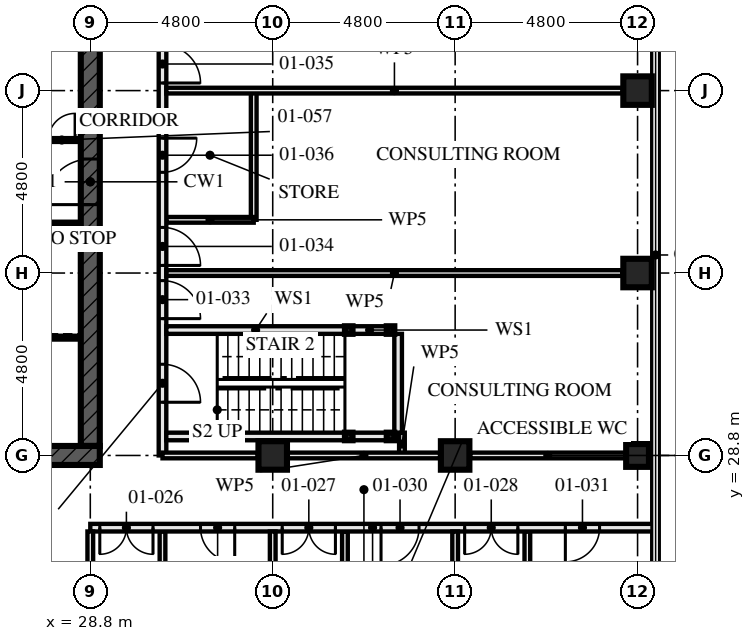
"""IFC4 building model, lengths in metres.
Left out: names, types, materials, properties, quantities, classifications, styles, units other than length and angle.
Written with IfcOpenShell. Run it as: python <this file> out.ifc"""

import sys

from ifc_helpers import new_model, si_unit, direction, frame, frame_2d, origin, origin_2d, place, context, subcontext, project, spatial, rectangle, hollow_rectangle, extrude, element, fill, save


model = new_model("IFC4")
c1 = context("Model", 3, precision=1e-05, world=origin(), true_north=direction((0.0, 1.0)))
c2 = subcontext(c1, "Body", "Model", "MODEL_VIEW")
j1 = project(units=[si_unit("LENGTHUNIT", "METRE"), si_unit("PLANEANGLEUNIT", "RADIAN")], contexts=[c1])
p1 = place(None, origin())
s1 = spatial("IfcSite", under=j1, at=p1, CompositionType="ELEMENT")
p2 = place(p1, origin())
s2 = spatial("IfcBuilding", under=s1, at=p2, CompositionType="ELEMENT")
p3 = place(p2, frame((0.0, 0.0, 4.5)))
s3 = spatial("IfcBuildingStorey", under=s2, at=p3, CompositionType="ELEMENT", Elevation=4.5)
for number, where, z_axis, x_axis in (
    (1, (33.6, 28.8, 0.0), (0.0, 0.0, 1.0), (0.0, 1.0, 0.0)),
    (2, (38.4, 28.8, 0.0), (0.0, 0.0, 1.0), (0.0, 1.0, 0.0)),
):
    element("IfcColumn", number, at=place(p3, frame(where, z_axis=z_axis, x_axis=x_axis)), inside=s3, PredefinedType="COLUMN", context=c2, shape_type="SweptSolid", body=[
        extrude(hollow_rectangle(XDim=0.75, YDim=0.75, WallThickness=0.08, at=origin_2d()), origin(), (0.0, 0.0, 1.0), 4.5),
    ])
p4 = place(p3, frame((43.2, 28.8, 0.0), z_axis=(0.0, 0.0, 1.0), x_axis=(0.0, 1.0, 0.0)))
e3 = element("IfcColumn", 3, at=p4, inside=s3, PredefinedType="COLUMN", context=c2, shape_type="SweptSolid", body=[
    extrude(hollow_rectangle(XDim=0.6, YDim=0.6, WallThickness=0.08, at=origin_2d()), origin(), (0.0, 0.0, 1.0), 4.5),
])
for number, where, z_axis, x_axis in (
    (4, (43.2, 33.6, 0.0), (0.0, 0.0, 1.0), (1.0, 0.0, 0.0)),
    (5, (43.2, 38.4, 0.0), (0.0, 0.0, 1.0), (1.0, 0.0, 0.0)),
):
    element("IfcColumn", number, at=place(p3, frame(where, z_axis=z_axis, x_axis=x_axis)), inside=s3, PredefinedType="COLUMN", context=c2, shape_type="SweptSolid", body=[
        extrude(hollow_rectangle(XDim=0.75, YDim=0.75, WallThickness=0.08, at=origin_2d()), origin(), (0.0, 0.0, 1.0), 4.5),
    ])
p5 = place(p3, frame((14.15, 28.8, -0.17), z_axis=(0.0, 0.0, 1.0), x_axis=(1.0, 0.0, 0.0)))
e6 = element("IfcWall", 6, at=p5, inside=s3, PredefinedType="SHEAR", context=c2, shape_type="SweptSolid", body=[
    extrude(rectangle(XDim=14.9, YDim=0.5, at=frame_2d((7.45, 0.0))), origin(), (0.0, 0.0, 1.0), 4.5),
])
p6 = place(p5, frame((6.85, 0.0, 0.17)))
e7 = element("IfcOpeningElement", 7, at=p6, cuts=e6, PredefinedType="OPENING", context=c2, shape_type="SweptSolid", body=[
    extrude(rectangle(XDim=1.2, YDim=2.1, at=frame_2d((0.6, 1.05))), frame((0.0, 0.26, 0.0), z_axis=(0.0, -1.0, 0.0), x_axis=(1.0, 0.0, 0.0)), (0.0, 0.0, 1.0), 0.521),
])
p7 = place(p3, frame((28.8, 29.05, -0.17), z_axis=(0.0, 0.0, 1.0), x_axis=(0.0, 1.0, 0.0)))
e8 = element("IfcWall", 8, at=p7, inside=s3, PredefinedType="SHEAR", context=c2, shape_type="SweptSolid", body=[
    extrude(rectangle(XDim=13.9, YDim=0.5, at=frame_2d((6.95, 0.0))), origin(), (0.0, 0.0, 1.0), 4.5),
])
p8 = place(p7, frame((6.35, 0.0, 0.17)))
e9 = element("IfcOpeningElement", 9, at=p8, cuts=e8, PredefinedType="OPENING", context=c2, shape_type="SweptSolid", body=[
    extrude(rectangle(XDim=1.2, YDim=2.1, at=frame_2d((0.6, 1.05))), frame((0.0, 0.26, 0.0), z_axis=(0.0, -1.0, 0.0), x_axis=(1.0, 0.0, 0.0)), (0.0, 0.0, 1.0), 0.521),
])
for number, where, z_axis, x_axis in (
    (10, (36.7, 29.3, 0.0), (0.0, 0.0, 1.0), (1.0, 0.0, 0.0)),
    (11, (36.7, 32.1, 0.0), (0.0, 0.0, 1.0), (1.0, 0.0, 0.0)),
    (12, (35.6, 29.3, 0.0), (0.0, 0.0, 1.0), (1.0, 0.0, 0.0)),
    (13, (35.6, 32.1, 0.0), (0.0, 0.0, 1.0), (1.0, 0.0, 0.0)),
):
    element("IfcColumn", number, at=place(p3, frame(where, z_axis=z_axis, x_axis=x_axis)), inside=s3, PredefinedType="COLUMN", context=c2, shape_type="SweptSolid", body=[
        extrude(hollow_rectangle(XDim=0.2, YDim=0.2, WallThickness=0.008, at=origin_2d()), origin(), (0.0, 0.0, 1.0), 4.33),
    ])
for number, where, z_axis, x_axis in (
    (14, (30.7, 23.8, 0.0), (0.0, 0.0, 1.0), (0.0, 1.0, 0.0)),
    (15, (35.5, 23.8, 0.0), (0.0, 0.0, 1.0), (0.0, 1.0, 0.0)),
    (16, (40.3, 23.8, 0.0), (0.0, 0.0, 1.0), (0.0, 1.0, 0.0)),
):
    element("IfcWall", number, at=place(p3, frame(where, z_axis=z_axis, x_axis=x_axis)), inside=s3, PredefinedType="PARTITIONING", context=c2, shape_type="SweptSolid", body=[
        extrude(rectangle(XDim=3.0, YDim=0.15, at=frame_2d((1.5, 0.0))), origin(), (0.0, 0.0, 1.0), 3.55),
    ])
p9 = place(p3, frame((33.6, 14.705, 0.0), z_axis=(0.0, 0.0, 1.0), x_axis=(0.0, 1.0, 0.0)))
e17 = element("IfcWall", 17, at=p9, inside=s3, PredefinedType="PARTITIONING", context=c2, shape_type="SweptSolid", body=[
    extrude(rectangle(XDim=12.095, YDim=0.15, at=frame_2d((6.048, 0.0))), origin(), (0.0, 0.0, 1.0), 3.55),
])
p10 = place(p3, frame((38.4, 19.504, 0.0), z_axis=(0.0, 0.0, 1.0), x_axis=(0.0, 1.0, 0.0)))
e18 = element("IfcWall", 18, at=p10, inside=s3, PredefinedType="PARTITIONING", context=c2, shape_type="SweptSolid", body=[
    extrude(rectangle(XDim=7.296, YDim=0.15, at=frame_2d((3.648, 0.0))), origin(), (0.0, 0.0, 1.0), 3.55),
])
p11 = place(p3, frame((28.8, 26.9, 0.0), z_axis=(0.0, 0.0, 1.0), x_axis=(1.0, 0.0, 0.0)))
e19 = element("IfcWall", 19, at=p11, inside=s3, PredefinedType="PARTITIONING", context=c2, shape_type="SweptSolid", body=[
    extrude(rectangle(XDim=14.855, YDim=0.2, at=frame_2d((7.427, 0.0))), origin(), (0.0, 0.0, 1.0), 3.32),
])
p12 = place(p11, frame((0.25, 0.0, 0.0)))
e20 = element("IfcOpeningElement", 20, at=p12, cuts=e19, PredefinedType="OPENING", context=c2, shape_type="SweptSolid", body=[
    extrude(rectangle(XDim=1.4, YDim=2.4, at=frame_2d((0.7, 1.2))), frame((0.0, 0.111, 0.0), z_axis=(0.0, -1.0, 0.0), x_axis=(1.0, 0.0, 0.0)), (0.0, 0.0, 1.0), 0.221),
])
p13 = place(p11, frame((5.05, 0.0, 0.0)))
e21 = element("IfcOpeningElement", 21, at=p13, cuts=e19, PredefinedType="OPENING", context=c2, shape_type="SweptSolid", body=[
    extrude(rectangle(XDim=1.4, YDim=2.4, at=frame_2d((0.7, 1.2))), frame((0.0, 0.111, 0.0), z_axis=(0.0, -1.0, 0.0), x_axis=(1.0, 0.0, 0.0)), (0.0, 0.0, 1.0), 0.221),
])
p14 = place(p11, frame((9.85, 0.0, 0.0)))
e22 = element("IfcOpeningElement", 22, at=p14, cuts=e19, PredefinedType="OPENING", context=c2, shape_type="SweptSolid", body=[
    extrude(rectangle(XDim=1.4, YDim=2.4, at=frame_2d((0.7, 1.2))), frame((0.0, 0.111, 0.0), z_axis=(0.0, -1.0, 0.0), x_axis=(1.0, 0.0, 0.0)), (0.0, 0.0, 1.0), 0.221),
])
p15 = place(p11, frame((2.9, 0.0, 0.0)))
e23 = element("IfcOpeningElement", 23, at=p15, cuts=e19, PredefinedType="OPENING", context=c2, shape_type="SweptSolid", body=[
    extrude(rectangle(XDim=0.9, YDim=2.1, at=frame_2d((0.45, 1.05))), frame((0.0, 0.111, 0.0), z_axis=(0.0, -1.0, 0.0), x_axis=(1.0, 0.0, 0.0)), (0.0, 0.0, 1.0), 0.221),
])
p16 = place(p11, frame((7.65, 0.0, 0.0)))
e24 = element("IfcOpeningElement", 24, at=p16, cuts=e19, PredefinedType="OPENING", context=c2, shape_type="SweptSolid", body=[
    extrude(rectangle(XDim=1.0, YDim=2.1, at=frame_2d((0.5, 1.05))), frame((0.0, 0.111, 0.0), z_axis=(0.0, -1.0, 0.0), x_axis=(1.0, 0.0, 0.0)), (0.0, 0.0, 1.0), 0.221),
])
p17 = place(p11, frame((12.5, 0.0, 0.0)))
e25 = element("IfcOpeningElement", 25, at=p17, cuts=e19, PredefinedType="OPENING", context=c2, shape_type="SweptSolid", body=[
    extrude(rectangle(XDim=0.9, YDim=2.1, at=frame_2d((0.45, 1.05))), frame((0.0, 0.111, 0.0), z_axis=(0.0, -1.0, 0.0), x_axis=(1.0, 0.0, 0.0)), (0.0, 0.0, 1.0), 0.221),
])
p18 = place(p3, frame((36.6, 29.3, 0.0), z_axis=(0.0, 0.0, 1.0), x_axis=(-1.0, 0.0, 0.0)))
e26 = element("IfcWall", 26, at=p18, inside=s3, PredefinedType="SOLIDWALL", context=c2, shape_type="SweptSolid", body=[
    extrude(rectangle(XDim=0.9, YDim=0.2, at=frame_2d((0.45, 0.0))), origin(), (0.0, 0.0, 1.0), 3.99),
])
p19 = place(p3, frame((35.5, 29.3, 0.0), z_axis=(0.0, 0.0, 1.0), x_axis=(-1.0, 0.0, 0.0)))
e27 = element("IfcWall", 27, at=p19, inside=s3, PredefinedType="SOLIDWALL", context=c2, shape_type="SweptSolid", body=[
    extrude(rectangle(XDim=4.7, YDim=0.2, at=frame_2d((2.35, 0.0))), origin(), (0.0, 0.0, 1.0), 3.99),
])
p20 = place(p3, frame((36.6, 32.1, 0.0), z_axis=(0.0, 0.0, 1.0), x_axis=(-1.0, 0.0, 0.0)))
e28 = element("IfcWall", 28, at=p20, inside=s3, PredefinedType="SOLIDWALL", context=c2, shape_type="SweptSolid", body=[
    extrude(rectangle(XDim=0.9, YDim=0.2, at=frame_2d((0.45, 0.0))), origin(), (0.0, 0.0, 1.0), 3.99),
])
p21 = place(p3, frame((35.5, 32.1, 0.0), z_axis=(0.0, 0.0, 1.0), x_axis=(-1.0, 0.0, 0.0)))
e29 = element("IfcWall", 29, at=p21, inside=s3, PredefinedType="SOLIDWALL", context=c2, shape_type="SweptSolid", body=[
    extrude(rectangle(XDim=4.7, YDim=0.2, at=frame_2d((2.35, 0.0))), origin(), (0.0, 0.0, 1.0), 3.99),
])
p22 = place(p3, frame((36.9, 29.4, 0.0), z_axis=(0.0, 0.0, 1.0), x_axis=(0.0, 1.0, 0.0)))
e30 = element("IfcWall", 30, at=p22, inside=s3, PredefinedType="SOLIDWALL", context=c2, shape_type="SweptSolid", body=[
    extrude(rectangle(XDim=2.6, YDim=0.2, at=frame_2d((1.3, 0.0))), origin(), (0.0, 0.0, 1.0), 4.33),
])
p23 = place(p3, frame((33.1, 35.0, 0.0), z_axis=(0.0, 0.0, 1.0), x_axis=(-1.0, 0.0, 0.0)))
e31 = element("IfcWall", 31, at=p23, inside=s3, PredefinedType="PARTITIONING", context=c2, shape_type="SweptSolid", body=[
    extrude(rectangle(XDim=2.3, YDim=0.15, at=frame_2d((1.15, 0.0))), origin(), (0.0, 0.0, 1.0), 4.33),
])
p24 = place(p3, frame((33.1, 35.0, 0.0), z_axis=(0.0, 0.0, 1.0), x_axis=(0.0, 1.0, 0.0)))
e32 = element("IfcWall", 32, at=p24, inside=s3, PredefinedType="PARTITIONING", context=c2, shape_type="SweptSolid", body=[
    extrude(rectangle(XDim=3.4, YDim=0.15, at=frame_2d((1.7, 0.0))), origin(), (0.0, 0.0, 1.0), 4.33),
])
for number, where, z_axis, x_axis in (
    (33, (42.805, 33.6, 0.0), (0.0, 0.0, 1.0), (-1.0, 0.0, 0.0)),
    (34, (42.805, 38.4, 0.0), (0.0, 0.0, 1.0), (-1.0, 0.0, 0.0)),
):
    element("IfcWall", number, at=place(p3, frame(where, z_axis=z_axis, x_axis=x_axis)), inside=s3, PredefinedType="PARTITIONING", context=c2, shape_type="SweptSolid", body=[
        extrude(rectangle(XDim=12.005, YDim=0.15, at=frame_2d((6.002, 0.0))), origin(), (0.0, 0.0, 1.0), 3.55),
    ])
p25 = place(p3, frame((37.0, 28.8, 0.0), z_axis=(0.0, 0.0, 1.0), x_axis=(0.0, 1.0, 0.0)))
e35 = element("IfcWall", 35, at=p25, inside=s3, PredefinedType="PARTITIONING", context=c2, shape_type="SweptSolid", body=[
    extrude(rectangle(XDim=0.6, YDim=0.15, at=frame_2d((0.3, 0.0))), origin(), (0.0, 0.0, 1.0), 4.33),
])
p26 = place(p3, frame((30.7, 28.8, 0.0), z_axis=(0.0, 0.0, 1.0), x_axis=(0.0, 1.0, 0.0)))
e36 = element("IfcWall", 36, at=p26, inside=s3, PredefinedType="PARTITIONING", context=c2, shape_type="SweptSolid", body=[
    extrude(rectangle(XDim=14.4, YDim=0.2, at=frame_2d((7.2, 0.0))), origin(), (0.0, 0.0, 1.0), 3.55),
])
p27 = place(p26, frame((1.4, 0.0, 0.0)))
e37 = element("IfcOpeningElement", 37, at=p27, cuts=e36, PredefinedType="OPENING", context=c2, shape_type="SweptSolid", body=[
    extrude(rectangle(XDim=1.0, YDim=2.1, at=frame_2d((0.5, 1.05))), frame((0.0, 0.111, 0.0), z_axis=(0.0, -1.0, 0.0), x_axis=(1.0, 0.0, 0.0)), (0.0, 0.0, 1.0), 0.221),
])
p28 = place(p26, frame((3.6, 0.0, 0.0)))
e38 = element("IfcOpeningElement", 38, at=p28, cuts=e36, PredefinedType="OPENING", context=c2, shape_type="SweptSolid", body=[
    extrude(rectangle(XDim=1.0, YDim=2.4, at=frame_2d((0.5, 1.2))), frame((0.0, 0.111, 0.0), z_axis=(0.0, -1.0, 0.0), x_axis=(1.0, 0.0, 0.0)), (0.0, 0.0, 1.0), 0.221),
])
p29 = place(p26, frame((5.0, 0.0, 0.0)))
e39 = element("IfcOpeningElement", 39, at=p29, cuts=e36, PredefinedType="OPENING", context=c2, shape_type="SweptSolid", body=[
    extrude(rectangle(XDim=1.0, YDim=2.4, at=frame_2d((0.5, 1.2))), frame((0.0, 0.111, 0.0), z_axis=(0.0, -1.0, 0.0), x_axis=(1.0, 0.0, 0.0)), (0.0, 0.0, 1.0), 0.221),
])
p30 = place(p26, frame((9.8, 0.0, 0.0)))
e40 = element("IfcOpeningElement", 40, at=p30, cuts=e36, PredefinedType="OPENING", context=c2, shape_type="SweptSolid", body=[
    extrude(rectangle(XDim=1.0, YDim=2.4, at=frame_2d((0.5, 1.2))), frame((0.0, 0.111, 0.0), z_axis=(0.0, -1.0, 0.0), x_axis=(1.0, 0.0, 0.0)), (0.0, 0.0, 1.0), 0.221),
])
p31 = place(p26, frame((7.45, 0.0, 0.0)))
e41 = element("IfcOpeningElement", 41, at=p31, cuts=e36, PredefinedType="OPENING", context=c2, shape_type="SweptSolid", body=[
    extrude(rectangle(XDim=0.9, YDim=2.1, at=frame_2d((0.45, 1.05))), frame((0.0, 0.111, 0.0), z_axis=(0.0, -1.0, 0.0), x_axis=(1.0, 0.0, 0.0)), (0.0, 0.0, 1.0), 0.221),
])
p32 = place(p26, frame((12.2, 0.0, 0.0)))
e42 = element("IfcOpeningElement", 42, at=p32, cuts=e36, PredefinedType="OPENING", context=c2, shape_type="SweptSolid", body=[
    extrude(rectangle(XDim=1.0, YDim=2.1, at=frame_2d((0.5, 1.05))), frame((0.0, 0.111, 0.0), z_axis=(0.0, -1.0, 0.0), x_axis=(1.0, 0.0, 0.0)), (0.0, 0.0, 1.0), 0.221),
])
p33 = place(p3, frame((23.05, 34.9, 0.0), z_axis=(0.0, 0.0, 1.0), x_axis=(1.0, 0.0, 0.0)))
e43 = element("IfcWall", 43, at=p33, inside=s3, PredefinedType="SOLIDWALL", context=c2, shape_type="SweptSolid", body=[
    extrude(rectangle(XDim=5.5, YDim=0.1, at=frame_2d((2.75, 0.0))), origin(), (0.0, 0.0, 1.0), 4.33),
])
p34 = place(p3, frame((22.65, 37.1, 0.0), z_axis=(0.0, 0.0, 1.0), x_axis=(1.0, 0.0, 0.0)))
e44 = element("IfcWall", 44, at=p34, inside=s3, PredefinedType="SOLIDWALL", context=c2, shape_type="SweptSolid", body=[
    extrude(rectangle(XDim=5.9, YDim=0.1, at=frame_2d((2.95, 0.0))), origin(), (0.0, 0.0, 1.0), 4.33),
])
p35 = place(p34, frame((3.5, 0.0, 0.0)))
e45 = element("IfcOpeningElement", 45, at=p35, cuts=e44, PredefinedType="OPENING", context=c2, shape_type="SweptSolid", body=[
    extrude(rectangle(XDim=0.9, YDim=2.1, at=frame_2d((0.45, 1.05))), frame((0.0, 0.061, 0.0), z_axis=(0.0, -1.0, 0.0), x_axis=(1.0, 0.0, 0.0)), (0.0, 0.0, 1.0), 0.121),
])
p36 = place(p34, frame((5.05, 0.0, 0.0)))
e46 = element("IfcOpeningElement", 46, at=p36, cuts=e44, PredefinedType="OPENING", context=c2, shape_type="SweptSolid", body=[
    extrude(rectangle(XDim=0.7, YDim=2.1, at=frame_2d((0.35, 1.05))), frame((0.0, 0.061, 0.0), z_axis=(0.0, -1.0, 0.0), x_axis=(1.0, 0.0, 0.0)), (0.0, 0.0, 1.0), 0.121),
])
p37 = place(p3, frame((23.15, 31.9, 0.0), z_axis=(0.0, 0.0, 1.0), x_axis=(1.0, 0.0, 0.0)))
e47 = element("IfcWall", 47, at=p37, inside=s3, PredefinedType="SOLIDWALL", context=c2, shape_type="SweptSolid", body=[
    extrude(rectangle(XDim=5.4, YDim=0.1, at=frame_2d((2.7, 0.0))), origin(), (0.0, 0.0, 1.0), 4.33),
])
p38 = place(p3, frame((28.8, 24.395, 0.0), z_axis=(0.0, 0.0, 1.0), x_axis=(0.0, 1.0, 0.0)))
e48 = element("IfcWall", 48, at=p38, inside=s3, PredefinedType="PARTITIONING", context=c2, shape_type="SweptSolid", body=[
    extrude(rectangle(XDim=2.405, YDim=0.15, at=frame_2d((1.203, 0.0))), origin(), (0.0, 0.0, 1.0), 3.32),
])
p39 = place(p3, frame((42.88, 28.8, 0.0), z_axis=(0.0, 0.0, 1.0), x_axis=(-1.0, 0.0, 0.0)))
e49 = element("IfcWall", 49, at=p39, inside=s3, PredefinedType="PARTITIONING", context=c2, shape_type="SweptSolid", body=[
    extrude(rectangle(XDim=4.085, YDim=0.15, at=frame_2d((2.042, 0.0))), origin(), (0.0, 0.0, 1.0), 3.32),
])
p40 = place(p3, frame((38.005, 28.8, 0.0), z_axis=(0.0, 0.0, 1.0), x_axis=(-1.0, 0.0, 0.0)))
e50 = element("IfcWall", 50, at=p40, inside=s3, PredefinedType="PARTITIONING", context=c2, shape_type="SweptSolid", body=[
    extrude(rectangle(XDim=4.01, YDim=0.15, at=frame_2d((2.005, 0.0))), origin(), (0.0, 0.0, 1.0), 3.32),
])
p41 = place(p3, frame((33.205, 28.8, 0.0), z_axis=(0.0, 0.0, 1.0), x_axis=(-1.0, 0.0, 0.0)))
e51 = element("IfcWall", 51, at=p41, inside=s3, PredefinedType="PARTITIONING", context=c2, shape_type="SweptSolid", body=[
    extrude(rectangle(XDim=2.505, YDim=0.15, at=frame_2d((1.252, 0.0))), origin(), (0.0, 0.0, 1.0), 3.32),
])
p42 = place(p12, frame((1.4, 0.0, 0.0), z_axis=(0.0, 0.0, 1.0), x_axis=(-1.0, 0.0, 0.0)))
e52 = element("IfcDoor", 52, at=p42, inside=s3, OperationType="DOUBLE_DOOR_SINGLE_SWING", PredefinedType="DOOR", context=c2, shape_type="SweptSolid", body=[
    extrude(rectangle(XDim=1.4, YDim=2.4, at=frame_2d((0.7, 1.2))), frame((0.0, 0.027, 0.0), z_axis=(0.0, -1.0, 0.0), x_axis=(1.0, 0.0, 0.0)), (0.0, 0.0, 1.0), 0.054),
])
fill(e20, e52)
p43 = place(p13, frame((1.4, 0.0, 0.0), z_axis=(0.0, 0.0, 1.0), x_axis=(-1.0, 0.0, 0.0)))
e53 = element("IfcDoor", 53, at=p43, inside=s3, OperationType="DOUBLE_DOOR_SINGLE_SWING", PredefinedType="DOOR", context=c2, shape_type="SweptSolid", body=[
    extrude(rectangle(XDim=1.4, YDim=2.4, at=frame_2d((0.7, 1.2))), frame((0.0, 0.027, 0.0), z_axis=(0.0, -1.0, 0.0), x_axis=(1.0, 0.0, 0.0)), (0.0, 0.0, 1.0), 0.054),
])
fill(e21, e53)
p44 = place(p14, frame((1.4, 0.0, 0.0), z_axis=(0.0, 0.0, 1.0), x_axis=(-1.0, 0.0, 0.0)))
e54 = element("IfcDoor", 54, at=p44, inside=s3, OperationType="DOUBLE_DOOR_SINGLE_SWING", PredefinedType="DOOR", context=c2, shape_type="SweptSolid", body=[
    extrude(rectangle(XDim=1.4, YDim=2.4, at=frame_2d((0.7, 1.2))), frame((0.0, 0.027, 0.0), z_axis=(0.0, -1.0, 0.0), x_axis=(1.0, 0.0, 0.0)), (0.0, 0.0, 1.0), 0.054),
])
fill(e22, e54)
p45 = place(p15, frame((0.9, 0.0, 0.0), z_axis=(0.0, 0.0, 1.0), x_axis=(-1.0, 0.0, 0.0)))
e55 = element("IfcDoor", 55, at=p45, inside=s3, OperationType="SINGLE_SWING_RIGHT", PredefinedType="DOOR", context=c2, shape_type="SweptSolid", body=[
    extrude(rectangle(XDim=0.9, YDim=2.1, at=frame_2d((0.45, 1.05))), frame((0.0, 0.027, 0.0), z_axis=(0.0, -1.0, 0.0), x_axis=(1.0, 0.0, 0.0)), (0.0, 0.0, 1.0), 0.054),
])
fill(e23, e55)
p46 = place(p16, frame((1.0, 0.0, 0.0), z_axis=(0.0, 0.0, 1.0), x_axis=(-1.0, 0.0, 0.0)))
e56 = element("IfcDoor", 56, at=p46, inside=s3, OperationType="SINGLE_SWING_LEFT", PredefinedType="DOOR", context=c2, shape_type="SweptSolid", body=[
    extrude(rectangle(XDim=1.0, YDim=2.1, at=frame_2d((0.5, 1.05))), frame((0.0, 0.027, 0.0), z_axis=(0.0, -1.0, 0.0), x_axis=(1.0, 0.0, 0.0)), (0.0, 0.0, 1.0), 0.054),
])
fill(e24, e56)
p47 = place(p17, frame((0.9, 0.0, 0.0), z_axis=(0.0, 0.0, 1.0), x_axis=(-1.0, 0.0, 0.0)))
e57 = element("IfcDoor", 57, at=p47, inside=s3, OperationType="SINGLE_SWING_LEFT", PredefinedType="DOOR", context=c2, shape_type="SweptSolid", body=[
    extrude(rectangle(XDim=0.9, YDim=2.1, at=frame_2d((0.45, 1.05))), frame((0.0, 0.027, 0.0), z_axis=(0.0, -1.0, 0.0), x_axis=(1.0, 0.0, 0.0)), (0.0, 0.0, 1.0), 0.054),
])
fill(e25, e57)
p48 = place(p27, frame((1.0, 0.0, 0.0), z_axis=(0.0, 0.0, 1.0), x_axis=(-1.0, 0.0, 0.0)))
e58 = element("IfcDoor", 58, at=p48, inside=s3, OperationType="SINGLE_SWING_LEFT", PredefinedType="DOOR", context=c2, shape_type="SweptSolid", body=[
    extrude(rectangle(XDim=1.0, YDim=2.1, at=frame_2d((0.5, 1.05))), frame((0.0, 0.032, 0.0), z_axis=(0.0, -1.0, 0.0), x_axis=(1.0, 0.0, 0.0)), (0.0, 0.0, 1.0), 0.064),
])
fill(e37, e58)
p49 = place(p28, frame((1.0, 0.0, 0.0), z_axis=(0.0, 0.0, 1.0), x_axis=(-1.0, 0.0, 0.0)))
e59 = element("IfcDoor", 59, at=p49, inside=s3, OperationType="SINGLE_SWING_LEFT", PredefinedType="DOOR", context=c2, shape_type="SweptSolid", body=[
    extrude(rectangle(XDim=1.0, YDim=2.4, at=frame_2d((0.5, 1.2))), frame((0.0, 0.027, 0.0), z_axis=(0.0, -1.0, 0.0), x_axis=(1.0, 0.0, 0.0)), (0.0, 0.0, 1.0), 0.054),
])
fill(e38, e59)
p50 = place(p29, frame((1.0, 0.0, 0.0), z_axis=(0.0, 0.0, 1.0), x_axis=(-1.0, 0.0, 0.0)))
e60 = element("IfcDoor", 60, at=p50, inside=s3, OperationType="SINGLE_SWING_LEFT", PredefinedType="DOOR", context=c2, shape_type="SweptSolid", body=[
    extrude(rectangle(XDim=1.0, YDim=2.4, at=frame_2d((0.5, 1.2))), frame((0.0, 0.027, 0.0), z_axis=(0.0, -1.0, 0.0), x_axis=(1.0, 0.0, 0.0)), (0.0, 0.0, 1.0), 0.054),
])
fill(e39, e60)
p51 = place(p30, frame((1.0, 0.0, 0.0), z_axis=(0.0, 0.0, 1.0), x_axis=(-1.0, 0.0, 0.0)))
e61 = element("IfcDoor", 61, at=p51, inside=s3, OperationType="SINGLE_SWING_LEFT", PredefinedType="DOOR", context=c2, shape_type="SweptSolid", body=[
    extrude(rectangle(XDim=1.0, YDim=2.4, at=frame_2d((0.5, 1.2))), frame((0.0, 0.027, 0.0), z_axis=(0.0, -1.0, 0.0), x_axis=(1.0, 0.0, 0.0)), (0.0, 0.0, 1.0), 0.054),
])
fill(e40, e61)
p52 = place(p31, frame((0.9, 0.0, 0.0), z_axis=(0.0, 0.0, 1.0), x_axis=(-1.0, 0.0, 0.0)))
e62 = element("IfcDoor", 62, at=p52, inside=s3, OperationType="SINGLE_SWING_RIGHT", PredefinedType="DOOR", context=c2, shape_type="SweptSolid", body=[
    extrude(rectangle(XDim=0.9, YDim=2.1, at=frame_2d((0.45, 1.05))), frame((0.0, 0.027, 0.0), z_axis=(0.0, -1.0, 0.0), x_axis=(1.0, 0.0, 0.0)), (0.0, 0.0, 1.0), 0.054),
])
fill(e41, e62)
p53 = place(p36, origin())
e63 = element("IfcDoor", 63, at=p53, inside=s3, OperationType="SINGLE_SWING_LEFT", PredefinedType="DOOR", context=c2, shape_type="SweptSolid", body=[
    extrude(rectangle(XDim=0.7, YDim=2.1, at=frame_2d((0.35, 1.05))), frame((0.0, 0.027, 0.0), z_axis=(0.0, -1.0, 0.0), x_axis=(1.0, 0.0, 0.0)), (0.0, 0.0, 1.0), 0.054),
])
fill(e46, e63)
p54 = place(p8, origin())
e64 = element("IfcDoor", 64, at=p54, inside=s3, OperationType="SINGLE_SWING_LEFT", PredefinedType="DOOR", context=c2, shape_type="SweptSolid", body=[
    extrude(rectangle(XDim=1.2, YDim=2.1, at=frame_2d((0.6, 1.05))), frame((0.0, 0.027, 0.0), z_axis=(0.0, -1.0, 0.0), x_axis=(1.0, 0.0, 0.0)), (0.0, 0.0, 1.0), 0.054),
])
fill(e9, e64)
save(model, sys.argv[1])
